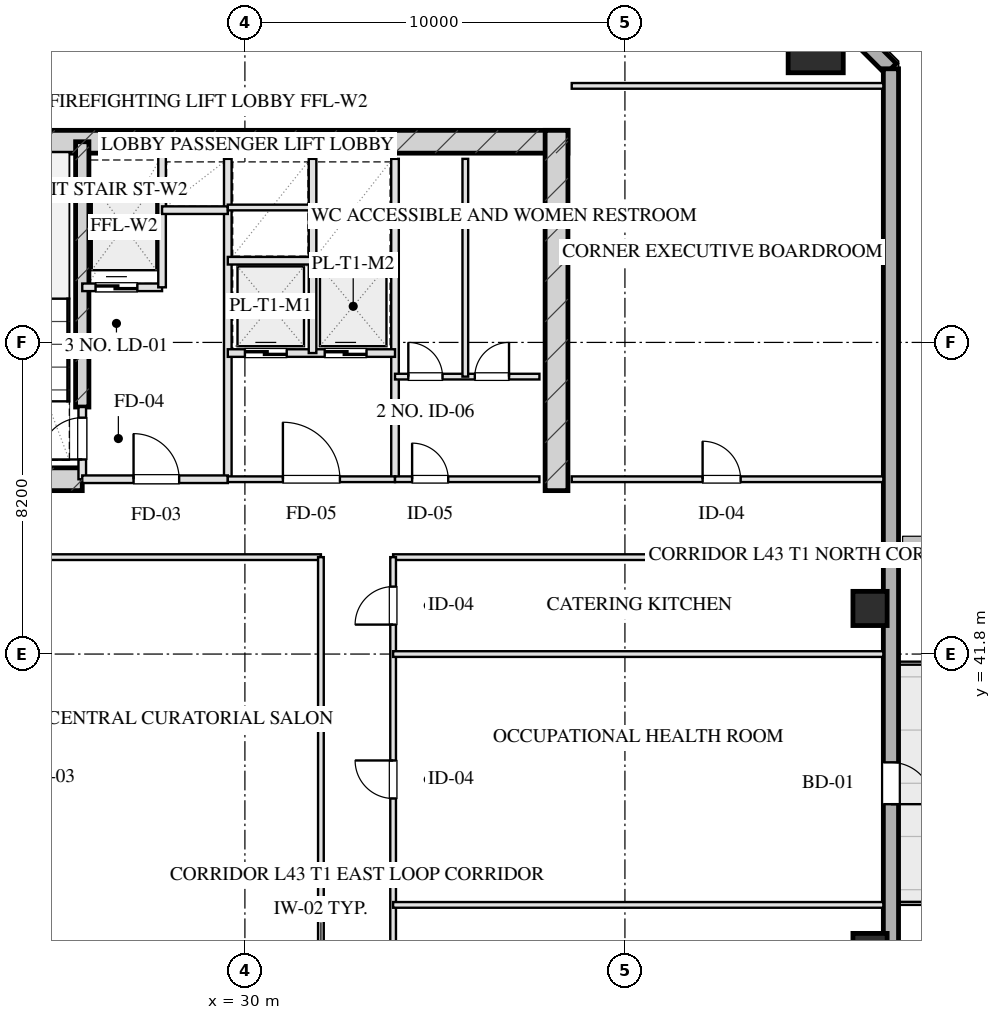
"""IFC4 building model, lengths in metres.
Left out: names, types, materials, properties, quantities, classifications, styles, units other than length and angle.
Written with IfcOpenShell. Run it as: python <this file> out.ifc"""

import sys

from ifc_helpers import new_model, si_unit, direction, frame, frame_2d, origin, origin_2d, place, context, subcontext, project, spatial, rectangle, hollow_rectangle, extrude, element, fill, save


model = new_model("IFC4")
c1 = context("Model", 3, precision=1e-05, world=origin(), true_north=direction((0.0, 1.0)))
c2 = subcontext(c1, "Body", "Model", "MODEL_VIEW")
j1 = project(units=[si_unit("LENGTHUNIT", "METRE"), si_unit("PLANEANGLEUNIT", "RADIAN")], contexts=[c1])
p1 = place(None, origin())
s1 = spatial("IfcSite", under=j1, at=p1, CompositionType="ELEMENT")
p2 = place(p1, origin())
s2 = spatial("IfcBuilding", under=s1, at=p2, CompositionType="ELEMENT")
p3 = place(p2, frame((0.0, 0.0, 163.3)))
s3 = spatial("IfcBuildingStorey", under=s2, at=p3, CompositionType="ELEMENT", Elevation=163.3)
p4 = place(p3, frame((21.5, 55.28, 0.0), z_axis=(0.0, 0.0, 1.0), x_axis=(1.0, 0.0, 0.0)))
e1 = element("IfcWall", 1, at=p4, inside=s3, PredefinedType="SHEAR", context=c2, shape_type="SweptSolid", body=[
    extrude(rectangle(XDim=17.0, YDim=0.6, at=frame_2d((8.5, 0.0))), origin(), (0.0, 0.0, 1.0), 3.45),
])
p5 = place(p3, frame((38.2, 46.1, 0.0), z_axis=(0.0, 0.0, 1.0), x_axis=(0.0, 1.0, 0.0)))
e2 = element("IfcWall", 2, at=p5, inside=s3, PredefinedType="SHEAR", context=c2, shape_type="SweptSolid", body=[
    extrude(rectangle(XDim=9.48, YDim=0.6, at=frame_2d((4.74, 0.0))), origin(), (0.0, 0.0, 1.0), 3.45),
])
p6 = place(p3, frame((25.72, 48.3, 0.0), z_axis=(0.0, 0.0, 1.0), x_axis=(0.0, 1.0, 0.0)))
e3 = element("IfcWall", 3, at=p6, inside=s3, PredefinedType="SHEAR", context=c2, shape_type="SweptSolid", body=[
    extrude(rectangle(XDim=6.98, YDim=0.35, at=frame_2d((3.49, 0.0))), origin(), (0.0, 0.0, 1.0), 3.45),
])
p7 = place(p3, frame((21.5, 46.4, 0.0), z_axis=(0.0, 0.0, 1.0), x_axis=(1.0, 0.0, 0.0)))
e4 = element("IfcWall", 4, at=p7, inside=s3, PredefinedType="SHEAR", context=c2, shape_type="SweptSolid", body=[
    extrude(rectangle(XDim=4.22, YDim=0.6, at=frame_2d((2.11, 0.0))), origin(), (0.0, 0.0, 1.0), 3.45),
])
p8 = place(p3, frame((45.02, 57.82, 0.0), z_axis=(0.0, 0.0, 1.0), x_axis=(1.0, 0.0, 0.0)))
e5 = element("IfcColumn", 5, at=p8, inside=s3, PredefinedType="COLUMN", context=c2, shape_type="SweptSolid", body=[
    extrude(hollow_rectangle(XDim=1.45, YDim=1.45, WallThickness=0.05, at=origin_2d()), origin(), (0.0, 0.0, 1.0), 3.451),
])
for number, where, z_axis, x_axis in (
    (6, (46.45, 34.0, 0.0), (0.0, 0.0, 1.0), (1.0, 0.0, 0.0)),
    (7, (46.45, 43.0, 0.0), (0.0, 0.0, 1.0), (1.0, 0.0, 0.0)),
):
    element("IfcColumn", number, at=place(p3, frame(where, z_axis=z_axis, x_axis=x_axis)), inside=s3, PredefinedType="COLUMN", context=c2, shape_type="SweptSolid", body=[
        extrude(hollow_rectangle(XDim=0.9, YDim=0.9, WallThickness=0.032, at=origin_2d()), origin(), (0.0, 0.0, 1.0), 3.451),
    ])
p9 = place(p3, frame((44.4, 59.8, 0.0), z_axis=(0.0, 0.0, 1.0), x_axis=(0.707106781187, -0.707106781187, 0.0)))
e8 = element("IfcWall", 8, at=p9, inside=s3, PredefinedType="SOLIDWALL", context=c2, shape_type="SweptSolid", body=[
    extrude(rectangle(XDim=3.677, YDim=0.4, at=frame_2d((1.838, 0.0))), origin(), (0.0, 0.0, 1.0), 2.61),
])
p10 = place(p3, frame((47.0, 57.2, 0.0), z_axis=(0.0, 0.0, 1.0), x_axis=(0.0, -1.0, 0.0)))
e9 = element("IfcWall", 9, at=p10, inside=s3, PredefinedType="SOLIDWALL", context=c2, shape_type="SweptSolid", body=[
    extrude(rectangle(XDim=46.4, YDim=0.4, at=frame_2d((23.2, 0.0))), origin(), (0.0, 0.0, 1.0), 2.61),
])
p11 = place(p10, frame((28.475, 0.0, 0.75)))
e10 = element("IfcOpeningElement", 10, at=p11, cuts=e9, PredefinedType="OPENING", context=c2, shape_type="SweptSolid", body=[
    extrude(rectangle(XDim=2.25, YDim=1.46, at=frame_2d((1.125, 0.73))), frame((0.0, 0.21, 0.0), z_axis=(0.0, -1.0, 0.0), x_axis=(1.0, 0.0, 0.0)), (0.0, 0.0, 1.0), 0.42),
])
p12 = place(p10, frame((24.675, 0.0, 0.75)))
e11 = element("IfcOpeningElement", 11, at=p12, cuts=e9, PredefinedType="OPENING", context=c2, shape_type="SweptSolid", body=[
    extrude(rectangle(XDim=2.25, YDim=1.46, at=frame_2d((1.125, 0.73))), frame((0.0, 0.21, 0.0), z_axis=(0.0, -1.0, 0.0), x_axis=(1.0, 0.0, 0.0)), (0.0, 0.0, 1.0), 0.42),
])
p13 = place(p10, frame((18.25, 0.0, 0.0)))
e12 = element("IfcOpeningElement", 12, at=p13, cuts=e9, PredefinedType="OPENING", context=c2, shape_type="SweptSolid", body=[
    extrude(rectangle(XDim=1.1, YDim=2.15, at=frame_2d((0.55, 1.075))), frame((0.0, 0.21, 0.0), z_axis=(0.0, -1.0, 0.0), x_axis=(1.0, 0.0, 0.0)), (0.0, 0.0, 1.0), 0.42),
])
p14 = place(p3, frame((25.72, 46.4, 0.0), z_axis=(0.0, 0.0, 1.0), x_axis=(0.0, 1.0, 0.0)))
e13 = element("IfcWall", 13, at=p14, inside=s3, PredefinedType="PARTITIONING", context=c2, shape_type="SweptSolid", body=[
    extrude(rectangle(XDim=1.9, YDim=0.2, at=frame_2d((0.95, 0.0))), origin(), (0.0, 0.0, 1.0), 3.175),
])
p15 = place(p14, frame((0.52, 0.0, 0.0)))
e14 = element("IfcOpeningElement", 14, at=p15, cuts=e13, PredefinedType="OPENING", context=c2, shape_type="SweptSolid", body=[
    extrude(rectangle(XDim=1.1, YDim=2.05, at=frame_2d((0.55, 1.025))), frame((0.0, 0.11, 0.0), z_axis=(0.0, -1.0, 0.0), x_axis=(1.0, 0.0, 0.0)), (0.0, 0.0, 1.0), 0.22),
])
p16 = place(p3, frame((29.55, 46.4, 0.0), z_axis=(0.0, 0.0, 1.0), x_axis=(0.0, 1.0, 0.0)))
e15 = element("IfcWall", 15, at=p16, inside=s3, PredefinedType="PARTITIONING", context=c2, shape_type="SweptSolid", body=[
    extrude(rectangle(XDim=8.43, YDim=0.2, at=frame_2d((4.215, 0.0))), origin(), (0.0, 0.0, 1.0), 3.175),
])
p17 = place(p3, frame((25.72, 46.4, 0.0), z_axis=(0.0, 0.0, 1.0), x_axis=(1.0, 0.0, 0.0)))
e16 = element("IfcWall", 16, at=p17, inside=s3, PredefinedType="PARTITIONING", context=c2, shape_type="SweptSolid", body=[
    extrude(rectangle(XDim=3.83, YDim=0.2, at=frame_2d((1.915, 0.0))), origin(), (0.0, 0.0, 1.0), 3.175),
])
p18 = place(p17, frame((1.35, 0.0, 0.0)))
e17 = element("IfcOpeningElement", 17, at=p18, cuts=e16, PredefinedType="OPENING", context=c2, shape_type="SweptSolid", body=[
    extrude(rectangle(XDim=1.2, YDim=2.05, at=frame_2d((0.6, 1.025))), frame((0.0, 0.11, 0.0), z_axis=(0.0, -1.0, 0.0), x_axis=(1.0, 0.0, 0.0)), (0.0, 0.0, 1.0), 0.22),
])
p19 = place(p3, frame((25.72, 51.45, 0.0), z_axis=(0.0, 0.0, 1.0), x_axis=(1.0, 0.0, 0.0)))
e18 = element("IfcWall", 18, at=p19, inside=s3, PredefinedType="PARTITIONING", context=c2, shape_type="SweptSolid", body=[
    extrude(rectangle(XDim=2.1, YDim=0.2, at=frame_2d((1.05, 0.0))), origin(), (0.0, 0.0, 1.0), 3.175),
])
p20 = place(p19, frame((0.35, 0.0, 0.0)))
e19 = element("IfcOpeningElement", 19, at=p20, cuts=e18, PredefinedType="OPENING", context=c2, shape_type="SweptSolid", body=[
    extrude(rectangle(XDim=1.1, YDim=2.05, at=frame_2d((0.55, 1.025))), frame((0.0, 0.11, 0.0), z_axis=(0.0, -1.0, 0.0), x_axis=(1.0, 0.0, 0.0)), (0.0, 0.0, 1.0), 0.22),
])
p21 = place(p3, frame((27.82, 51.45, 0.0), z_axis=(0.0, 0.0, 1.0), x_axis=(0.0, 1.0, 0.0)))
e20 = element("IfcWall", 20, at=p21, inside=s3, PredefinedType="PARTITIONING", context=c2, shape_type="SweptSolid", body=[
    extrude(rectangle(XDim=3.7, YDim=0.2, at=frame_2d((1.85, 0.0))), origin(), (0.0, 0.0, 1.0), 3.175),
])
p22 = place(p3, frame((27.82, 53.48, 0.0), z_axis=(0.0, 0.0, 1.0), x_axis=(1.0, 0.0, 0.0)))
e21 = element("IfcWall", 21, at=p22, inside=s3, PredefinedType="PARTITIONING", context=c2, shape_type="SweptSolid", body=[
    extrude(rectangle(XDim=1.73, YDim=0.2, at=frame_2d((0.865, 0.0))), origin(), (0.0, 0.0, 1.0), 3.175),
])
p23 = place(p3, frame((33.95, 46.4, 0.0), z_axis=(0.0, 0.0, 1.0), x_axis=(0.0, 1.0, 0.0)))
e22 = element("IfcWall", 22, at=p23, inside=s3, PredefinedType="PARTITIONING", context=c2, shape_type="SweptSolid", body=[
    extrude(rectangle(XDim=8.43, YDim=0.2, at=frame_2d((4.215, 0.0))), origin(), (0.0, 0.0, 1.0), 3.175),
])
p24 = place(p3, frame((29.55, 46.4, 0.0), z_axis=(0.0, 0.0, 1.0), x_axis=(1.0, 0.0, 0.0)))
e23 = element("IfcWall", 23, at=p24, inside=s3, PredefinedType="PARTITIONING", context=c2, shape_type="SweptSolid", body=[
    extrude(rectangle(XDim=4.4, YDim=0.15, at=frame_2d((2.2, 0.0))), origin(), (0.0, 0.0, 1.0), 3.175),
])
p25 = place(p24, frame((1.45, 0.0, 0.0)))
e24 = element("IfcOpeningElement", 24, at=p25, cuts=e23, PredefinedType="OPENING", context=c2, shape_type="SweptSolid", body=[
    extrude(rectangle(XDim=1.5, YDim=2.05, at=frame_2d((0.75, 1.025))), frame((0.0, 0.085, 0.0), z_axis=(0.0, -1.0, 0.0), x_axis=(1.0, 0.0, 0.0)), (0.0, 0.0, 1.0), 0.17),
])
p26 = place(p3, frame((29.55, 49.72, 0.0), z_axis=(0.0, 0.0, 1.0), x_axis=(1.0, 0.0, 0.0)))
e25 = element("IfcWall", 25, at=p26, inside=s3, PredefinedType="PARTITIONING", context=c2, shape_type="SweptSolid", body=[
    extrude(rectangle(XDim=4.4, YDim=0.2, at=frame_2d((2.2, 0.0))), origin(), (0.0, 0.0, 1.0), 3.175),
])
p27 = place(p26, frame((0.45, 0.0, 0.0)))
e26 = element("IfcOpeningElement", 26, at=p27, cuts=e25, PredefinedType="OPENING", context=c2, shape_type="SweptSolid", body=[
    extrude(rectangle(XDim=1.1, YDim=2.05, at=frame_2d((0.55, 1.025))), frame((0.0, 0.11, 0.0), z_axis=(0.0, -1.0, 0.0), x_axis=(1.0, 0.0, 0.0)), (0.0, 0.0, 1.0), 0.22),
])
p28 = place(p26, frame((2.55, 0.0, 0.0)))
e27 = element("IfcOpeningElement", 27, at=p28, cuts=e25, PredefinedType="OPENING", context=c2, shape_type="SweptSolid", body=[
    extrude(rectangle(XDim=1.1, YDim=2.05, at=frame_2d((0.55, 1.025))), frame((0.0, 0.11, 0.0), z_axis=(0.0, -1.0, 0.0), x_axis=(1.0, 0.0, 0.0)), (0.0, 0.0, 1.0), 0.22),
])
p29 = place(p3, frame((31.78, 49.72, 0.0), z_axis=(0.0, 0.0, 1.0), x_axis=(0.0, 1.0, 0.0)))
e28 = element("IfcWall", 28, at=p29, inside=s3, PredefinedType="PARTITIONING", context=c2, shape_type="SweptSolid", body=[
    extrude(rectangle(XDim=5.11, YDim=0.2, at=frame_2d((2.555, 0.0))), origin(), (0.0, 0.0, 1.0), 3.175),
])
p30 = place(p3, frame((29.55, 52.15, 0.0), z_axis=(0.0, 0.0, 1.0), x_axis=(1.0, 0.0, 0.0)))
e29 = element("IfcWall", 29, at=p30, inside=s3, PredefinedType="PARTITIONING", context=c2, shape_type="SweptSolid", body=[
    extrude(rectangle(XDim=4.4, YDim=0.2, at=frame_2d((2.2, 0.0))), origin(), (0.0, 0.0, 1.0), 3.175),
])
p31 = place(p3, frame((29.55, 53.55, 0.0), z_axis=(0.0, 0.0, 1.0), x_axis=(1.0, 0.0, 0.0)))
e30 = element("IfcWall", 30, at=p31, inside=s3, PredefinedType="PARTITIONING", context=c2, shape_type="SweptSolid", body=[
    extrude(rectangle(XDim=2.23, YDim=0.15, at=frame_2d((1.115, 0.0))), origin(), (0.0, 0.0, 1.0), 3.175),
])
p32 = place(p3, frame((33.95, 46.4, 0.0), z_axis=(0.0, 0.0, 1.0), x_axis=(1.0, 0.0, 0.0)))
e31 = element("IfcWall", 31, at=p32, inside=s3, PredefinedType="PARTITIONING", context=c2, shape_type="SweptSolid", body=[
    extrude(rectangle(XDim=3.8, YDim=0.15, at=frame_2d((1.9, 0.0))), origin(), (0.0, 0.0, 1.0), 3.175),
])
p33 = place(p32, frame((0.45, 0.0, 0.0)))
e32 = element("IfcOpeningElement", 32, at=p33, cuts=e31, PredefinedType="OPENING", context=c2, shape_type="SweptSolid", body=[
    extrude(rectangle(XDim=0.95, YDim=2.05, at=frame_2d((0.475, 1.025))), frame((0.0, 0.085, 0.0), z_axis=(0.0, -1.0, 0.0), x_axis=(1.0, 0.0, 0.0)), (0.0, 0.0, 1.0), 0.17),
])
p34 = place(p3, frame((33.95, 49.1, 0.0), z_axis=(0.0, 0.0, 1.0), x_axis=(1.0, 0.0, 0.0)))
e33 = element("IfcWall", 33, at=p34, inside=s3, PredefinedType="PARTITIONING", context=c2, shape_type="SweptSolid", body=[
    extrude(rectangle(XDim=3.8, YDim=0.15, at=frame_2d((1.9, 0.0))), origin(), (0.0, 0.0, 1.0), 3.175),
])
p35 = place(p34, frame((0.35, 0.0, 0.0)))
e34 = element("IfcOpeningElement", 34, at=p35, cuts=e33, PredefinedType="OPENING", context=c2, shape_type="SweptSolid", body=[
    extrude(rectangle(XDim=0.9, YDim=2.05, at=frame_2d((0.45, 1.025))), frame((0.0, 0.085, 0.0), z_axis=(0.0, -1.0, 0.0), x_axis=(1.0, 0.0, 0.0)), (0.0, 0.0, 1.0), 0.17),
])
p36 = place(p34, frame((2.1, 0.0, 0.0)))
e35 = element("IfcOpeningElement", 35, at=p36, cuts=e33, PredefinedType="OPENING", context=c2, shape_type="SweptSolid", body=[
    extrude(rectangle(XDim=0.9, YDim=2.05, at=frame_2d((0.45, 1.025))), frame((0.0, 0.085, 0.0), z_axis=(0.0, -1.0, 0.0), x_axis=(1.0, 0.0, 0.0)), (0.0, 0.0, 1.0), 0.17),
])
p37 = place(p3, frame((35.8, 49.1, 0.0), z_axis=(0.0, 0.0, 1.0), x_axis=(0.0, 1.0, 0.0)))
e36 = element("IfcWall", 36, at=p37, inside=s3, PredefinedType="PARTITIONING", context=c2, shape_type="SweptSolid", body=[
    extrude(rectangle(XDim=5.73, YDim=0.15, at=frame_2d((2.865, 0.0))), origin(), (0.0, 0.0, 1.0), 3.175),
])
p38 = place(p3, frame((38.6, 56.75, 0.0), z_axis=(0.0, 0.0, 1.0), x_axis=(1.0, 0.0, 0.0)))
e37 = element("IfcWall", 37, at=p38, inside=s3, PredefinedType="PARTITIONING", context=c2, shape_type="SweptSolid", body=[
    extrude(rectangle(XDim=8.2, YDim=0.15, at=frame_2d((4.1, 0.0))), origin(), (0.0, 0.0, 1.0), 3.175),
])
p39 = place(p3, frame((38.6, 46.4, 0.0), z_axis=(0.0, 0.0, 1.0), x_axis=(1.0, 0.0, 0.0)))
e38 = element("IfcWall", 38, at=p39, inside=s3, PredefinedType="PARTITIONING", context=c2, shape_type="SweptSolid", body=[
    extrude(rectangle(XDim=8.2, YDim=0.15, at=frame_2d((4.1, 0.0))), origin(), (0.0, 0.0, 1.0), 3.175),
])
p40 = place(p39, frame((3.444, 0.0, 0.0)))
e39 = element("IfcOpeningElement", 39, at=p40, cuts=e38, PredefinedType="OPENING", context=c2, shape_type="SweptSolid", body=[
    extrude(rectangle(XDim=1.0, YDim=2.05, at=frame_2d((0.5, 1.025))), frame((0.0, 0.085, 0.0), z_axis=(0.0, -1.0, 0.0), x_axis=(1.0, 0.0, 0.0)), (0.0, 0.0, 1.0), 0.17),
])
p41 = place(p3, frame((23.4, 44.35, 0.0), z_axis=(0.0, 0.0, 1.0), x_axis=(1.0, 0.0, 0.0)))
e40 = element("IfcWall", 40, at=p41, inside=s3, PredefinedType="PARTITIONING", context=c2, shape_type="SweptSolid", body=[
    extrude(rectangle(XDim=8.6, YDim=0.15, at=frame_2d((4.3, 0.0))), origin(), (0.0, 0.0, 1.0), 3.175),
])
p42 = place(p3, frame((33.9, 44.35, 0.0), z_axis=(0.0, 0.0, 1.0), x_axis=(1.0, 0.0, 0.0)))
e41 = element("IfcWall", 41, at=p42, inside=s3, PredefinedType="PARTITIONING", context=c2, shape_type="SweptSolid", body=[
    extrude(rectangle(XDim=12.9, YDim=0.15, at=frame_2d((6.45, 0.0))), origin(), (0.0, 0.0, 1.0), 3.175),
])
p43 = place(p3, frame((32.0, 23.65, 0.0), z_axis=(0.0, 0.0, 1.0), x_axis=(0.0, 1.0, 0.0)))
e42 = element("IfcWall", 42, at=p43, inside=s3, PredefinedType="PARTITIONING", context=c2, shape_type="SweptSolid", body=[
    extrude(rectangle(XDim=20.7, YDim=0.15, at=frame_2d((10.35, 0.0))), origin(), (0.0, 0.0, 1.0), 3.175),
])
p44 = place(p3, frame((33.9, 23.65, 0.0), z_axis=(0.0, 0.0, 1.0), x_axis=(0.0, 1.0, 0.0)))
e43 = element("IfcWall", 43, at=p44, inside=s3, PredefinedType="PARTITIONING", context=c2, shape_type="SweptSolid", body=[
    extrude(rectangle(XDim=20.7, YDim=0.15, at=frame_2d((10.35, 0.0))), origin(), (0.0, 0.0, 1.0), 3.175),
])
p45 = place(p44, frame((2.329, 0.0, 0.0)))
e44 = element("IfcOpeningElement", 44, at=p45, cuts=e43, PredefinedType="OPENING", context=c2, shape_type="SweptSolid", body=[
    extrude(rectangle(XDim=1.0, YDim=2.05, at=frame_2d((0.5, 1.025))), frame((0.0, 0.085, 0.0), z_axis=(0.0, -1.0, 0.0), x_axis=(1.0, 0.0, 0.0)), (0.0, 0.0, 1.0), 0.17),
])
p46 = place(p44, frame((8.104, 0.0, 0.0)))
e45 = element("IfcOpeningElement", 45, at=p46, cuts=e43, PredefinedType="OPENING", context=c2, shape_type="SweptSolid", body=[
    extrude(rectangle(XDim=1.0, YDim=2.05, at=frame_2d((0.5, 1.025))), frame((0.0, 0.085, 0.0), z_axis=(0.0, -1.0, 0.0), x_axis=(1.0, 0.0, 0.0)), (0.0, 0.0, 1.0), 0.17),
])
p47 = place(p44, frame((14.35, 0.0, 0.0)))
e46 = element("IfcOpeningElement", 46, at=p47, cuts=e43, PredefinedType="OPENING", context=c2, shape_type="SweptSolid", body=[
    extrude(rectangle(XDim=1.0, YDim=2.05, at=frame_2d((0.5, 1.025))), frame((0.0, 0.085, 0.0), z_axis=(0.0, -1.0, 0.0), x_axis=(1.0, 0.0, 0.0)), (0.0, 0.0, 1.0), 0.17),
])
p48 = place(p44, frame((18.925, 0.0, 0.0)))
e47 = element("IfcOpeningElement", 47, at=p48, cuts=e43, PredefinedType="OPENING", context=c2, shape_type="SweptSolid", body=[
    extrude(rectangle(XDim=1.0, YDim=2.05, at=frame_2d((0.5, 1.025))), frame((0.0, 0.085, 0.0), z_axis=(0.0, -1.0, 0.0), x_axis=(1.0, 0.0, 0.0)), (0.0, 0.0, 1.0), 0.17),
])
for number, where, z_axis, x_axis in (
    (48, (33.9, 35.2, 0.0), (0.0, 0.0, 1.0), (1.0, 0.0, 0.0)),
    (49, (33.9, 41.8, 0.0), (0.0, 0.0, 1.0), (1.0, 0.0, 0.0)),
):
    element("IfcWall", number, at=place(p3, frame(where, z_axis=z_axis, x_axis=x_axis)), inside=s3, PredefinedType="PARTITIONING", context=c2, shape_type="SweptSolid", body=[
        extrude(rectangle(XDim=12.9, YDim=0.15, at=frame_2d((6.45, 0.0))), origin(), (0.0, 0.0, 1.0), 3.175),
    ])
p49 = place(p13, origin())
e50 = element("IfcDoor", 50, at=p49, inside=s3, OperationType="SINGLE_SWING_RIGHT", PredefinedType="DOOR", context=c2, shape_type="SweptSolid", body=[
    extrude(rectangle(XDim=1.1, YDim=2.15, at=frame_2d((0.55, 1.075))), frame((0.0, 0.025, 0.0), z_axis=(0.0, -1.0, 0.0), x_axis=(1.0, 0.0, 0.0)), (0.0, 0.0, 1.0), 0.05),
])
fill(e12, e50)
p50 = place(p15, origin())
e51 = element("IfcDoor", 51, at=p50, inside=s3, OperationType="SINGLE_SWING_LEFT", PredefinedType="DOOR", context=c2, shape_type="SweptSolid", body=[
    extrude(rectangle(XDim=1.1, YDim=2.05, at=frame_2d((0.55, 1.025))), frame((0.0, 0.025, 0.0), z_axis=(0.0, -1.0, 0.0), x_axis=(1.0, 0.0, 0.0)), (0.0, 0.0, 1.0), 0.05),
])
fill(e14, e51)
p51 = place(p18, origin())
e52 = element("IfcDoor", 52, at=p51, inside=s3, OperationType="SINGLE_SWING_LEFT", PredefinedType="DOOR", context=c2, shape_type="SweptSolid", body=[
    extrude(rectangle(XDim=1.2, YDim=2.05, at=frame_2d((0.6, 1.025))), frame((0.0, 0.025, 0.0), z_axis=(0.0, -1.0, 0.0), x_axis=(1.0, 0.0, 0.0)), (0.0, 0.0, 1.0), 0.05),
])
fill(e17, e52)
p52 = place(p20, origin())
e53 = element("IfcDoor", 53, at=p52, inside=s3, OperationType="DOUBLE_DOOR_SLIDING", PredefinedType="DOOR", context=c2, shape_type="SweptSolid", body=[
    extrude(rectangle(XDim=1.1, YDim=2.05, at=frame_2d((0.55, 1.025))), frame((0.0, 0.025, 0.0), z_axis=(0.0, -1.0, 0.0), x_axis=(1.0, 0.0, 0.0)), (0.0, 0.0, 1.0), 0.05),
])
fill(e19, e53)
p53 = place(p25, origin())
e54 = element("IfcDoor", 54, at=p53, inside=s3, OperationType="SINGLE_SWING_LEFT", PredefinedType="DOOR", context=c2, shape_type="SweptSolid", body=[
    extrude(rectangle(XDim=1.5, YDim=2.05, at=frame_2d((0.75, 1.025))), frame((0.0, 0.025, 0.0), z_axis=(0.0, -1.0, 0.0), x_axis=(1.0, 0.0, 0.0)), (0.0, 0.0, 1.0), 0.05),
])
fill(e24, e54)
p54 = place(p27, origin())
e55 = element("IfcDoor", 55, at=p54, inside=s3, OperationType="DOUBLE_DOOR_SLIDING", PredefinedType="DOOR", context=c2, shape_type="SweptSolid", body=[
    extrude(rectangle(XDim=1.1, YDim=2.05, at=frame_2d((0.55, 1.025))), frame((0.0, 0.025, 0.0), z_axis=(0.0, -1.0, 0.0), x_axis=(1.0, 0.0, 0.0)), (0.0, 0.0, 1.0), 0.05),
])
fill(e26, e55)
p55 = place(p28, origin())
e56 = element("IfcDoor", 56, at=p55, inside=s3, OperationType="DOUBLE_DOOR_SLIDING", PredefinedType="DOOR", context=c2, shape_type="SweptSolid", body=[
    extrude(rectangle(XDim=1.1, YDim=2.05, at=frame_2d((0.55, 1.025))), frame((0.0, 0.025, 0.0), z_axis=(0.0, -1.0, 0.0), x_axis=(1.0, 0.0, 0.0)), (0.0, 0.0, 1.0), 0.05),
])
fill(e27, e56)
p56 = place(p33, origin())
e57 = element("IfcDoor", 57, at=p56, inside=s3, OperationType="SINGLE_SWING_LEFT", PredefinedType="DOOR", context=c2, shape_type="SweptSolid", body=[
    extrude(rectangle(XDim=0.95, YDim=2.05, at=frame_2d((0.475, 1.025))), frame((0.0, 0.025, 0.0), z_axis=(0.0, -1.0, 0.0), x_axis=(1.0, 0.0, 0.0)), (0.0, 0.0, 1.0), 0.05),
])
fill(e32, e57)
p57 = place(p35, origin())
e58 = element("IfcDoor", 58, at=p57, inside=s3, OperationType="SINGLE_SWING_LEFT", PredefinedType="DOOR", context=c2, shape_type="SweptSolid", body=[
    extrude(rectangle(XDim=0.9, YDim=2.05, at=frame_2d((0.45, 1.025))), frame((0.0, 0.025, 0.0), z_axis=(0.0, -1.0, 0.0), x_axis=(1.0, 0.0, 0.0)), (0.0, 0.0, 1.0), 0.05),
])
fill(e34, e58)
p58 = place(p36, origin())
e59 = element("IfcDoor", 59, at=p58, inside=s3, OperationType="SINGLE_SWING_RIGHT", PredefinedType="DOOR", context=c2, shape_type="SweptSolid", body=[
    extrude(rectangle(XDim=0.9, YDim=2.05, at=frame_2d((0.45, 1.025))), frame((0.0, 0.025, 0.0), z_axis=(0.0, -1.0, 0.0), x_axis=(1.0, 0.0, 0.0)), (0.0, 0.0, 1.0), 0.05),
])
fill(e35, e59)
p59 = place(p40, origin())
e60 = element("IfcDoor", 60, at=p59, inside=s3, OperationType="SINGLE_SWING_LEFT", PredefinedType="DOOR", context=c2, shape_type="SweptSolid", body=[
    extrude(rectangle(XDim=1.0, YDim=2.05, at=frame_2d((0.5, 1.025))), frame((0.0, 0.025, 0.0), z_axis=(0.0, -1.0, 0.0), x_axis=(1.0, 0.0, 0.0)), (0.0, 0.0, 1.0), 0.05),
])
fill(e39, e60)
p60 = place(p47, origin())
e61 = element("IfcDoor", 61, at=p60, inside=s3, OperationType="SINGLE_SWING_RIGHT", PredefinedType="DOOR", context=c2, shape_type="SweptSolid", body=[
    extrude(rectangle(XDim=1.0, YDim=2.05, at=frame_2d((0.5, 1.025))), frame((0.0, 0.025, 0.0), z_axis=(0.0, -1.0, 0.0), x_axis=(1.0, 0.0, 0.0)), (0.0, 0.0, 1.0), 0.05),
])
fill(e46, e61)
p61 = place(p48, origin())
e62 = element("IfcDoor", 62, at=p61, inside=s3, OperationType="SINGLE_SWING_LEFT", PredefinedType="DOOR", context=c2, shape_type="SweptSolid", body=[
    extrude(rectangle(XDim=1.0, YDim=2.05, at=frame_2d((0.5, 1.025))), frame((0.0, 0.025, 0.0), z_axis=(0.0, -1.0, 0.0), x_axis=(1.0, 0.0, 0.0)), (0.0, 0.0, 1.0), 0.05),
])
fill(e47, e62)
save(model, sys.argv[1])
